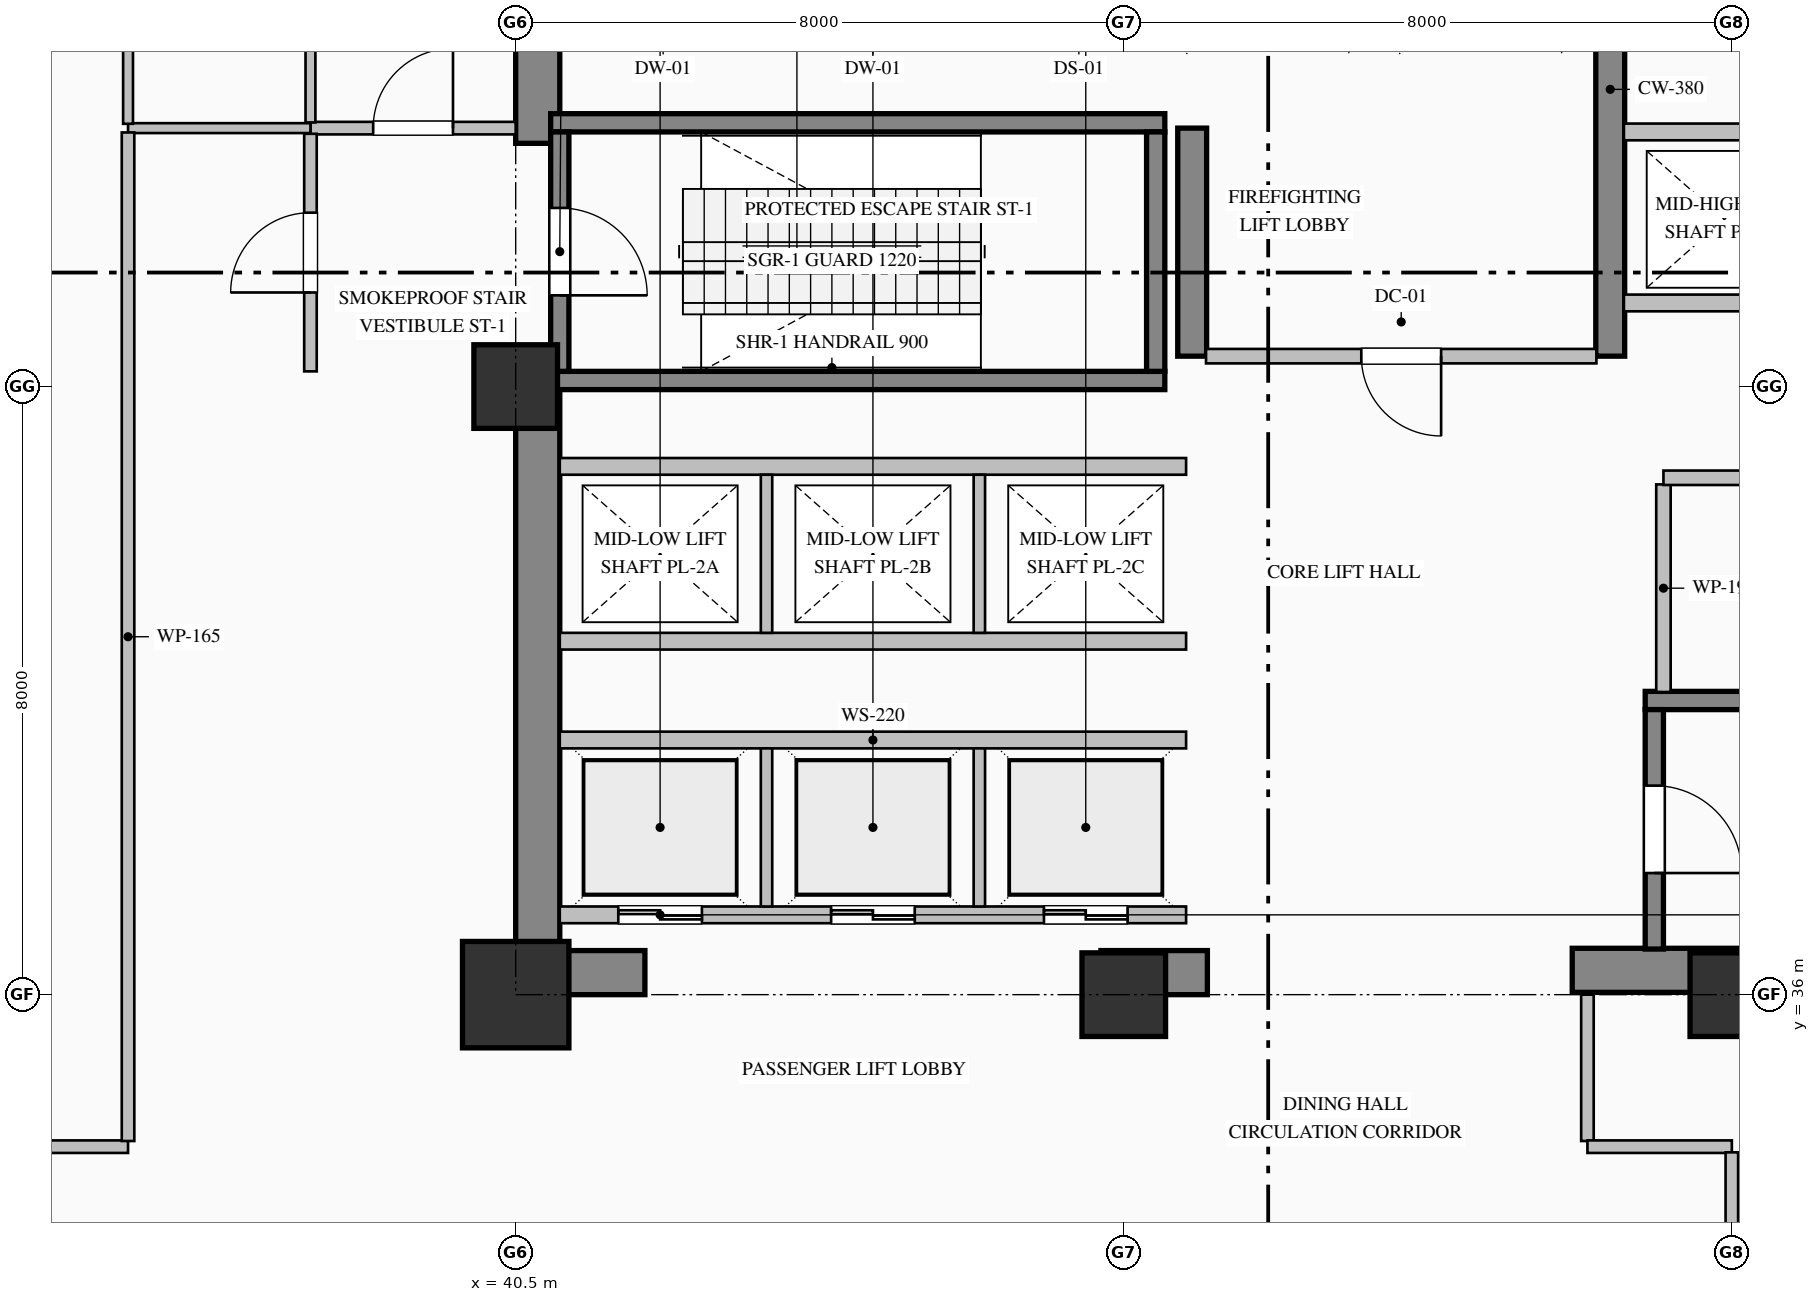
"""IFC4 building model, lengths in metres.
Left out: names, types, materials, properties, quantities, classifications, styles, units other than length and angle.
Written with IfcOpenShell. Run it as: python <this file> out.ifc"""

import sys

from ifc_helpers import new_model, si_unit, direction, frame, frame_2d, origin, origin_2d, place, context, subcontext, project, spatial, rectangle, hollow_rectangle, extrude, element, fill, save


model = new_model("IFC4")
c1 = context("Model", 3, precision=1e-05, world=origin(), true_north=direction((0.0, 1.0)))
c2 = subcontext(c1, "Body", "Model", "MODEL_VIEW")
j1 = project(units=[si_unit("LENGTHUNIT", "METRE"), si_unit("PLANEANGLEUNIT", "RADIAN")], contexts=[c1])
p1 = place(None, origin())
s1 = spatial("IfcSite", under=j1, at=p1, CompositionType="ELEMENT")
p2 = place(p1, origin())
s2 = spatial("IfcBuilding", under=s1, at=p2, CompositionType="ELEMENT")
p3 = place(p2, frame((0.0, 0.0, 22.8)))
s3 = spatial("IfcBuildingStorey", under=s2, at=p3, CompositionType="ELEMENT", Elevation=22.8)
p4 = place(p3, frame((40.79, 36.58, 0.0), z_axis=(0.0, 0.0, 1.0), x_axis=(0.0, 1.0, 0.0)))
e1 = element("IfcWall", 1, at=p4, inside=s3, PredefinedType="SHEAR", context=c2, shape_type="SweptSolid", body=[
    extrude(rectangle(XDim=7.82, YDim=0.58, at=frame_2d((3.91, 0.0))), origin(), (0.0, 0.0, 1.0), 5.15),
])
p5 = place(p3, frame((40.79, 47.2, 0.0), z_axis=(0.0, 0.0, 1.0), x_axis=(0.0, 1.0, 0.0)))
e2 = element("IfcWall", 2, at=p5, inside=s3, PredefinedType="SHEAR", context=c2, shape_type="SweptSolid", body=[
    extrude(rectangle(XDim=4.22, YDim=0.58, at=frame_2d((2.11, 0.0))), origin(), (0.0, 0.0, 1.0), 5.15),
])
p6 = place(p3, frame((40.5, 36.29, 0.0), z_axis=(0.0, 0.0, 1.0), x_axis=(1.0, 0.0, 0.0)))
e3 = element("IfcWall", 3, at=p6, inside=s3, PredefinedType="SHEAR", context=c2, shape_type="SweptSolid", body=[
    extrude(rectangle(XDim=1.7, YDim=0.58, at=frame_2d((0.85, 0.0))), origin(), (0.0, 0.0, 1.0), 5.15),
])
p7 = place(p3, frame((48.2, 36.29, 0.0), z_axis=(0.0, 0.0, 1.0), x_axis=(1.0, 0.0, 0.0)))
e4 = element("IfcWall", 4, at=p7, inside=s3, PredefinedType="SHEAR", context=c2, shape_type="SweptSolid", body=[
    extrude(rectangle(XDim=1.4, YDim=0.58, at=frame_2d((0.7, 0.0))), origin(), (0.0, 0.0, 1.0), 5.15),
])
p8 = place(p3, frame((54.4, 36.32, 0.0), z_axis=(0.0, 0.0, 1.0), x_axis=(1.0, 0.0, 0.0)))
e5 = element("IfcWall", 5, at=p8, inside=s3, PredefinedType="SHEAR", context=c2, shape_type="SweptSolid", body=[
    extrude(rectangle(XDim=9.6, YDim=0.58, at=frame_2d((4.8, 0.0))), origin(), (0.0, 0.0, 1.0), 5.4),
])
p9 = place(p3, frame((49.4, 44.4, 0.0), z_axis=(0.0, 0.0, 1.0), x_axis=(0.0, 1.0, 0.0)))
e6 = element("IfcWall", 6, at=p9, inside=s3, PredefinedType="SHEAR", context=c2, shape_type="SweptSolid", body=[
    extrude(rectangle(XDim=3.0, YDim=0.38, at=frame_2d((1.5, 0.0))), origin(), (0.0, 0.0, 1.0), 5.15),
])
p10 = place(p3, frame((54.9, 44.4, 0.0), z_axis=(0.0, 0.0, 1.0), x_axis=(0.0, 1.0, 0.0)))
e7 = element("IfcWall", 7, at=p10, inside=s3, PredefinedType="SHEAR", context=c2, shape_type="SweptSolid", body=[
    extrude(rectangle(XDim=7.02, YDim=0.38, at=frame_2d((3.51, 0.0))), origin(), (0.0, 0.0, 1.0), 5.15),
])
p11 = place(p3, frame((40.5, 36.0, 0.0), z_axis=(0.0, 0.0, 1.0), x_axis=(1.0, 0.0, 0.0)))
e8 = element("IfcColumn", 8, at=p11, inside=s3, PredefinedType="COLUMN", context=c2, shape_type="SweptSolid", body=[
    extrude(hollow_rectangle(XDim=1.4, YDim=1.4, WallThickness=0.05, at=origin_2d()), origin(), (0.0, 0.0, 1.0), 5.4),
])
for number, where, z_axis, x_axis in (
    (9, (40.5, 44.0, 0.0), (0.0, 0.0, 1.0), (1.0, 0.0, 0.0)),
    (10, (48.5, 36.0, 0.0), (0.0, 0.0, 1.0), (1.0, 0.0, 0.0)),
    (11, (56.5, 36.0, 0.0), (0.0, 0.0, 1.0), (1.0, 0.0, 0.0)),
):
    element("IfcColumn", number, at=place(p3, frame(where, z_axis=z_axis, x_axis=x_axis)), inside=s3, PredefinedType="COLUMN", context=c2, shape_type="SweptSolid", body=[
        extrude(rectangle(XDim=1.1, YDim=1.1, at=origin_2d()), origin(), (0.0, 0.0, 1.0), 5.4),
    ])
for number, where, z_axis, x_axis in (
    (12, (40.96, 47.47, 0.0), (0.0, 0.0, 1.0), (1.0, 0.0, 0.0)),
    (13, (49.04, 44.08, 0.0), (0.0, 0.0, 1.0), (-1.0, 0.0, 0.0)),
):
    element("IfcWall", number, at=place(p3, frame(where, z_axis=z_axis, x_axis=x_axis)), inside=s3, PredefinedType="SOLIDWALL", context=c2, shape_type="SweptSolid", body=[
        extrude(rectangle(XDim=8.08, YDim=0.24, at=frame_2d((4.04, 0.0))), origin(), (0.0, 0.0, 1.0), 5.4),
    ])
p12 = place(p3, frame((41.08, 47.35, 0.0), z_axis=(0.0, 0.0, 1.0), x_axis=(0.0, -1.0, 0.0)))
e14 = element("IfcWall", 14, at=p12, inside=s3, PredefinedType="SOLIDWALL", context=c2, shape_type="SweptSolid", body=[
    extrude(rectangle(XDim=3.15, YDim=0.24, at=frame_2d((1.575, 0.0))), origin(), (0.0, 0.0, 1.0), 5.4),
])
p13 = place(p12, frame((1.0, 0.0, 0.0)))
e15 = element("IfcOpeningElement", 15, at=p13, cuts=e14, PredefinedType="OPENING", context=c2, shape_type="SweptSolid", body=[
    extrude(rectangle(XDim=1.15, YDim=2.2, at=frame_2d((0.575, 1.1))), frame((0.0, 0.13, 0.0), z_axis=(0.0, -1.0, 0.0), x_axis=(1.0, 0.0, 0.0)), (0.0, 0.0, 1.0), 0.26),
])
p14 = place(p3, frame((48.92, 44.2, 0.0), z_axis=(0.0, 0.0, 1.0), x_axis=(0.0, 1.0, 0.0)))
e16 = element("IfcWall", 16, at=p14, inside=s3, PredefinedType="SOLIDWALL", context=c2, shape_type="SweptSolid", body=[
    extrude(rectangle(XDim=3.15, YDim=0.24, at=frame_2d((1.575, 0.0))), origin(), (0.0, 0.0, 1.0), 5.4),
])
p15 = place(p3, frame((55.36, 39.87, 0.0), z_axis=(0.0, 0.0, 1.0), x_axis=(1.0, 0.0, 0.0)))
e17 = element("IfcWall", 17, at=p15, inside=s3, PredefinedType="SOLIDWALL", context=c2, shape_type="SweptSolid", body=[
    extrude(rectangle(XDim=8.08, YDim=0.24, at=frame_2d((4.04, 0.0))), origin(), (0.0, 0.0, 1.0), 5.4),
])
p16 = place(p3, frame((55.48, 39.75, 0.0), z_axis=(0.0, 0.0, 1.0), x_axis=(0.0, -1.0, 0.0)))
e18 = element("IfcWall", 18, at=p16, inside=s3, PredefinedType="SOLIDWALL", context=c2, shape_type="SweptSolid", body=[
    extrude(rectangle(XDim=3.15, YDim=0.24, at=frame_2d((1.575, 0.0))), origin(), (0.0, 0.0, 1.0), 5.4),
])
p17 = place(p16, frame((1.0, 0.0, 0.0)))
e19 = element("IfcOpeningElement", 19, at=p17, cuts=e18, PredefinedType="OPENING", context=c2, shape_type="SweptSolid", body=[
    extrude(rectangle(XDim=1.15, YDim=2.2, at=frame_2d((0.575, 1.1))), frame((0.0, 0.13, 0.0), z_axis=(0.0, -1.0, 0.0), x_axis=(1.0, 0.0, 0.0)), (0.0, 0.0, 1.0), 0.26),
])
p18 = place(p3, frame((49.32, 37.05, 0.0), z_axis=(0.0, 0.0, 1.0), x_axis=(-1.0, 0.0, 0.0)))
e20 = element("IfcWall", 20, at=p18, inside=s3, PredefinedType="PARTITIONING", context=c2, shape_type="SweptSolid", body=[
    extrude(rectangle(XDim=8.24, YDim=0.22, at=frame_2d((4.12, 0.0))), origin(), (0.0, 0.0, 1.0), 5.15),
])
p19 = place(p18, frame((6.37, 0.0, 0.0)))
e21 = element("IfcOpeningElement", 21, at=p19, cuts=e20, PredefinedType="OPENING", context=c2, shape_type="SweptSolid", body=[
    extrude(rectangle(XDim=1.1, YDim=2.2, at=frame_2d((0.55, 1.1))), frame((0.0, 0.12, 0.0), z_axis=(0.0, -1.0, 0.0), x_axis=(1.0, 0.0, 0.0)), (0.0, 0.0, 1.0), 0.24),
])
p20 = place(p18, frame((3.57, 0.0, 0.0)))
e22 = element("IfcOpeningElement", 22, at=p20, cuts=e20, PredefinedType="OPENING", context=c2, shape_type="SweptSolid", body=[
    extrude(rectangle(XDim=1.1, YDim=2.2, at=frame_2d((0.55, 1.1))), frame((0.0, 0.12, 0.0), z_axis=(0.0, -1.0, 0.0), x_axis=(1.0, 0.0, 0.0)), (0.0, 0.0, 1.0), 0.24),
])
p21 = place(p18, frame((0.77, 0.0, 0.0)))
e23 = element("IfcOpeningElement", 23, at=p21, cuts=e20, PredefinedType="OPENING", context=c2, shape_type="SweptSolid", body=[
    extrude(rectangle(XDim=1.1, YDim=2.2, at=frame_2d((0.55, 1.1))), frame((0.0, 0.12, 0.0), z_axis=(0.0, -1.0, 0.0), x_axis=(1.0, 0.0, 0.0)), (0.0, 0.0, 1.0), 0.24),
])
p22 = place(p3, frame((41.08, 39.35, 0.0), z_axis=(0.0, 0.0, 1.0), x_axis=(1.0, 0.0, 0.0)))
e24 = element("IfcWall", 24, at=p22, inside=s3, PredefinedType="PARTITIONING", context=c2, shape_type="SweptSolid", body=[
    extrude(rectangle(XDim=8.24, YDim=0.22, at=frame_2d((4.12, 0.0))), origin(), (0.0, 0.0, 1.0), 5.15),
])
for number, where, z_axis, x_axis in (
    (25, (43.8, 37.16, 0.0), (0.0, 0.0, 1.0), (0.0, 1.0, 0.0)),
    (26, (46.6, 37.16, 0.0), (0.0, 0.0, 1.0), (0.0, 1.0, 0.0)),
):
    element("IfcWall", number, at=place(p3, frame(where, z_axis=z_axis, x_axis=x_axis)), inside=s3, PredefinedType="PARTITIONING", context=c2, shape_type="SweptSolid", body=[
        extrude(rectangle(XDim=2.08, YDim=0.15, at=frame_2d((1.04, 0.0))), origin(), (0.0, 0.0, 1.0), 5.15),
    ])
for number, where, z_axis, x_axis in (
    (27, (49.32, 40.65, 0.0), (0.0, 0.0, 1.0), (-1.0, 0.0, 0.0)),
    (28, (41.08, 42.95, 0.0), (0.0, 0.0, 1.0), (1.0, 0.0, 0.0)),
):
    element("IfcWall", number, at=place(p3, frame(where, z_axis=z_axis, x_axis=x_axis)), inside=s3, PredefinedType="PARTITIONING", context=c2, shape_type="SweptSolid", body=[
        extrude(rectangle(XDim=8.24, YDim=0.22, at=frame_2d((4.12, 0.0))), origin(), (0.0, 0.0, 1.0), 5.15),
    ])
for number, where, z_axis, x_axis in (
    (29, (43.8, 40.76, 0.0), (0.0, 0.0, 1.0), (0.0, 1.0, 0.0)),
    (30, (46.6, 40.76, 0.0), (0.0, 0.0, 1.0), (0.0, 1.0, 0.0)),
):
    element("IfcWall", number, at=place(p3, frame(where, z_axis=z_axis, x_axis=x_axis)), inside=s3, PredefinedType="PARTITIONING", context=c2, shape_type="SweptSolid", body=[
        extrude(rectangle(XDim=2.08, YDim=0.15, at=frame_2d((1.04, 0.0))), origin(), (0.0, 0.0, 1.0), 5.15),
    ])
for number, where, z_axis, x_axis in (
    (31, (63.32, 45.1, 0.0), (0.0, 0.0, 1.0), (-1.0, 0.0, 0.0)),
    (32, (55.08, 47.35, 0.0), (0.0, 0.0, 1.0), (1.0, 0.0, 0.0)),
):
    element("IfcWall", number, at=place(p3, frame(where, z_axis=z_axis, x_axis=x_axis)), inside=s3, PredefinedType="PARTITIONING", context=c2, shape_type="SweptSolid", body=[
        extrude(rectangle(XDim=8.24, YDim=0.22, at=frame_2d((4.12, 0.0))), origin(), (0.0, 0.0, 1.0), 5.15),
    ])
p23 = place(p3, frame((37.8, 47.4, 0.0), z_axis=(0.0, 0.0, 1.0), x_axis=(1.0, 0.0, 0.0)))
e33 = element("IfcWall", 33, at=p23, inside=s3, PredefinedType="PARTITIONING", context=c2, shape_type="SweptSolid", body=[
    extrude(rectangle(XDim=2.7, YDim=0.165, at=frame_2d((1.35, 0.0))), origin(), (0.0, 0.0, 1.0), 5.15),
])
p24 = place(p23, frame((0.825, 0.0, 0.0)))
e34 = element("IfcOpeningElement", 34, at=p24, cuts=e33, PredefinedType="OPENING", context=c2, shape_type="SweptSolid", body=[
    extrude(rectangle(XDim=1.05, YDim=2.15, at=frame_2d((0.525, 1.075))), frame((0.0, 0.093, 0.0), z_axis=(0.0, -1.0, 0.0), x_axis=(1.0, 0.0, 0.0)), (0.0, 0.0, 1.0), 0.185),
])
p25 = place(p3, frame((37.8, 44.2, 0.0), z_axis=(0.0, 0.0, 1.0), x_axis=(0.0, 1.0, 0.0)))
e35 = element("IfcWall", 35, at=p25, inside=s3, PredefinedType="PARTITIONING", context=c2, shape_type="SweptSolid", body=[
    extrude(rectangle(XDim=3.125, YDim=0.165, at=frame_2d((1.563, 0.0))), origin(), (0.0, 0.0, 1.0), 5.15),
])
p26 = place(p25, frame((1.038, 0.0, 0.0)))
e36 = element("IfcOpeningElement", 36, at=p26, cuts=e35, PredefinedType="OPENING", context=c2, shape_type="SweptSolid", body=[
    extrude(rectangle(XDim=1.05, YDim=2.15, at=frame_2d((0.525, 1.075))), frame((0.0, 0.093, 0.0), z_axis=(0.0, -1.0, 0.0), x_axis=(1.0, 0.0, 0.0)), (0.0, 0.0, 1.0), 0.185),
])
p27 = place(p3, frame((37.8, 47.475, 0.0), z_axis=(0.0, 0.0, 1.0), x_axis=(0.0, 1.0, 0.0)))
e37 = element("IfcWall", 37, at=p27, inside=s3, PredefinedType="PARTITIONING", context=c2, shape_type="SweptSolid", body=[
    extrude(rectangle(XDim=4.153, YDim=0.13, at=frame_2d((2.077, 0.0))), origin(), (0.0, 0.0, 1.0), 5.15),
])
p28 = place(p27, frame((1.567, 0.0, 0.0)))
e38 = element("IfcOpeningElement", 38, at=p28, cuts=e37, PredefinedType="OPENING", context=c2, shape_type="SweptSolid", body=[
    extrude(rectangle(XDim=1.02, YDim=2.15, at=frame_2d((0.51, 1.075))), frame((0.0, 0.075, 0.0), z_axis=(0.0, -1.0, 0.0), x_axis=(1.0, 0.0, 0.0)), (0.0, 0.0, 1.0), 0.15),
])
p29 = place(p3, frame((37.8, 47.4, 0.0), z_axis=(0.0, 0.0, 1.0), x_axis=(-1.0, 0.0, 0.0)))
e39 = element("IfcWall", 39, at=p29, inside=s3, PredefinedType="PARTITIONING", context=c2, shape_type="SweptSolid", body=[
    extrude(rectangle(XDim=2.4, YDim=0.13, at=frame_2d((1.2, 0.0))), origin(), (0.0, 0.0, 1.0), 5.15),
])
p30 = place(p3, frame((35.4, 47.457, 0.0), z_axis=(0.0, 0.0, 1.0), x_axis=(0.0, 1.0, 0.0)))
e40 = element("IfcWall", 40, at=p30, inside=s3, PredefinedType="PARTITIONING", context=c2, shape_type="SweptSolid", body=[
    extrude(rectangle(XDim=4.171, YDim=0.13, at=frame_2d((2.085, 0.0))), origin(), (0.0, 0.0, 1.0), 5.15),
])
p31 = place(p3, frame((54.718, 44.4, 0.0), z_axis=(0.0, 0.0, 1.0), x_axis=(-1.0, 0.0, 0.0)))
e41 = element("IfcWall", 41, at=p31, inside=s3, PredefinedType="PARTITIONING", context=c2, shape_type="SweptSolid", body=[
    extrude(rectangle(XDim=5.136, YDim=0.19, at=frame_2d((2.568, 0.0))), origin(), (0.0, 0.0, 1.0), 5.15),
])
p32 = place(p31, frame((2.043, 0.0, 0.0)))
e42 = element("IfcOpeningElement", 42, at=p32, cuts=e41, PredefinedType="OPENING", context=c2, shape_type="SweptSolid", body=[
    extrude(rectangle(XDim=1.05, YDim=2.15, at=frame_2d((0.525, 1.075))), frame((0.0, 0.105, 0.0), z_axis=(0.0, -1.0, 0.0), x_axis=(1.0, 0.0, 0.0)), (0.0, 0.0, 1.0), 0.21),
])
p33 = place(p3, frame((55.6, 42.713, 0.0), z_axis=(0.0, 0.0, 1.0), x_axis=(0.0, -1.0, 0.0)))
e43 = element("IfcWall", 43, at=p33, inside=s3, PredefinedType="PARTITIONING", context=c2, shape_type="SweptSolid", body=[
    extrude(rectangle(XDim=2.731, YDim=0.19, at=frame_2d((1.365, 0.0))), origin(), (0.0, 0.0, 1.0), 5.15),
])
p34 = place(p3, frame((63.42, 42.8, 0.0), z_axis=(0.0, 0.0, 1.0), x_axis=(-1.0, 0.0, 0.0)))
e44 = element("IfcWall", 44, at=p34, inside=s3, PredefinedType="PARTITIONING", context=c2, shape_type="SweptSolid", body=[
    extrude(rectangle(XDim=7.82, YDim=0.19, at=frame_2d((3.91, 0.0))), origin(), (0.0, 0.0, 1.0), 5.15),
])
p35 = place(p34, frame((3.21, 0.0, 0.0)))
e45 = element("IfcOpeningElement", 45, at=p35, cuts=e44, PredefinedType="OPENING", context=c2, shape_type="SweptSolid", body=[
    extrude(rectangle(XDim=1.4, YDim=2.25, at=frame_2d((0.7, 1.125))), frame((0.0, 0.105, 0.0), z_axis=(0.0, -1.0, 0.0), x_axis=(1.0, 0.0, 0.0)), (0.0, 0.0, 1.0), 0.21),
])
p36 = place(p3, frame((54.6, 36.0, 0.0), z_axis=(0.0, 0.0, 1.0), x_axis=(0.0, -1.0, 0.0)))
e46 = element("IfcWall", 46, at=p36, inside=s3, PredefinedType="PARTITIONING", context=c2, shape_type="SweptSolid", body=[
    extrude(rectangle(XDim=1.926, YDim=0.165, at=frame_2d((0.963, 0.0))), origin(), (0.0, 0.0, 1.0), 5.15),
])
p37 = place(p3, frame((54.6, 34.0, 0.0), z_axis=(0.0, 0.0, 1.0), x_axis=(1.0, 0.0, 0.0)))
e47 = element("IfcWall", 47, at=p37, inside=s3, PredefinedType="PARTITIONING", context=c2, shape_type="SweptSolid", body=[
    extrude(rectangle(XDim=1.9, YDim=0.165, at=frame_2d((0.95, 0.0))), origin(), (0.0, 0.0, 1.0), 5.15),
])
p38 = place(p3, frame((56.5, 33.926, 0.0), z_axis=(0.0, 0.0, 1.0), x_axis=(0.0, -1.0, 0.0)))
e48 = element("IfcWall", 48, at=p38, inside=s3, PredefinedType="PARTITIONING", context=c2, shape_type="SweptSolid", body=[
    extrude(rectangle(XDim=2.051, YDim=0.165, at=frame_2d((1.025, 0.0))), origin(), (0.0, 0.0, 1.0), 4.442),
])
p39 = place(p3, frame((16.5, 34.0, 0.0), z_axis=(0.0, 0.0, 1.0), x_axis=(1.0, 0.0, 0.0)))
e49 = element("IfcWall", 49, at=p39, inside=s3, PredefinedType="PARTITIONING", context=c2, shape_type="SweptSolid", body=[
    extrude(rectangle(XDim=18.9, YDim=0.165, at=frame_2d((9.45, 0.0))), origin(), (0.0, 0.0, 1.0), 5.15),
])
p40 = place(p39, frame((8.95, 0.0, 0.0)))
e50 = element("IfcOpeningElement", 50, at=p40, cuts=e49, PredefinedType="OPENING", context=c2, shape_type="SweptSolid", body=[
    extrude(rectangle(XDim=1.0, YDim=2.15, at=frame_2d((0.5, 1.075))), frame((0.0, 0.093, 0.0), z_axis=(0.0, -1.0, 0.0), x_axis=(1.0, 0.0, 0.0)), (0.0, 0.0, 1.0), 0.185),
])
p41 = place(p3, frame((35.4, 34.074, 0.0), z_axis=(0.0, 0.0, 1.0), x_axis=(0.0, 1.0, 0.0)))
e51 = element("IfcWall", 51, at=p41, inside=s3, PredefinedType="PARTITIONING", context=c2, shape_type="SweptSolid", body=[
    extrude(rectangle(XDim=13.269, YDim=0.165, at=frame_2d((6.634, 0.0))), origin(), (0.0, 0.0, 1.0), 5.15),
])
p42 = place(p13, origin())
e52 = element("IfcDoor", 52, at=p42, inside=s3, OperationType="SINGLE_SWING_RIGHT", PredefinedType="DOOR", context=c2, shape_type="SweptSolid", body=[
    extrude(rectangle(XDim=1.15, YDim=2.2, at=frame_2d((0.575, 1.1))), frame((0.0, 0.025, 0.0), z_axis=(0.0, -1.0, 0.0), x_axis=(1.0, 0.0, 0.0)), (0.0, 0.0, 1.0), 0.05),
])
fill(e15, e52)
p43 = place(p17, origin())
e53 = element("IfcDoor", 53, at=p43, inside=s3, OperationType="SINGLE_SWING_RIGHT", PredefinedType="DOOR", context=c2, shape_type="SweptSolid", body=[
    extrude(rectangle(XDim=1.15, YDim=2.2, at=frame_2d((0.575, 1.1))), frame((0.0, 0.025, 0.0), z_axis=(0.0, -1.0, 0.0), x_axis=(1.0, 0.0, 0.0)), (0.0, 0.0, 1.0), 0.05),
])
fill(e19, e53)
p44 = place(p19, origin())
e54 = element("IfcDoor", 54, at=p44, inside=s3, OperationType="DOUBLE_DOOR_SLIDING", PredefinedType="DOOR", context=c2, shape_type="SweptSolid", body=[
    extrude(rectangle(XDim=1.1, YDim=2.2, at=frame_2d((0.55, 1.1))), frame((0.0, 0.025, 0.0), z_axis=(0.0, -1.0, 0.0), x_axis=(1.0, 0.0, 0.0)), (0.0, 0.0, 1.0), 0.05),
])
fill(e21, e54)
p45 = place(p20, origin())
e55 = element("IfcDoor", 55, at=p45, inside=s3, OperationType="DOUBLE_DOOR_SLIDING", PredefinedType="DOOR", context=c2, shape_type="SweptSolid", body=[
    extrude(rectangle(XDim=1.1, YDim=2.2, at=frame_2d((0.55, 1.1))), frame((0.0, 0.025, 0.0), z_axis=(0.0, -1.0, 0.0), x_axis=(1.0, 0.0, 0.0)), (0.0, 0.0, 1.0), 0.05),
])
fill(e22, e55)
p46 = place(p21, origin())
e56 = element("IfcDoor", 56, at=p46, inside=s3, OperationType="DOUBLE_DOOR_SLIDING", PredefinedType="DOOR", context=c2, shape_type="SweptSolid", body=[
    extrude(rectangle(XDim=1.1, YDim=2.2, at=frame_2d((0.55, 1.1))), frame((0.0, 0.025, 0.0), z_axis=(0.0, -1.0, 0.0), x_axis=(1.0, 0.0, 0.0)), (0.0, 0.0, 1.0), 0.05),
])
fill(e23, e56)
p47 = place(p32, origin())
e57 = element("IfcDoor", 57, at=p47, inside=s3, OperationType="SINGLE_SWING_LEFT", PredefinedType="DOOR", context=c2, shape_type="SweptSolid", body=[
    extrude(rectangle(XDim=1.05, YDim=2.15, at=frame_2d((0.525, 1.075))), frame((0.0, 0.025, 0.0), z_axis=(0.0, -1.0, 0.0), x_axis=(1.0, 0.0, 0.0)), (0.0, 0.0, 1.0), 0.05),
])
fill(e42, e57)
p48 = place(p26, origin())
e58 = element("IfcDoor", 58, at=p48, inside=s3, OperationType="SINGLE_SWING_LEFT", PredefinedType="DOOR", context=c2, shape_type="SweptSolid", body=[
    extrude(rectangle(XDim=1.05, YDim=2.15, at=frame_2d((0.525, 1.075))), frame((0.0, 0.025, 0.0), z_axis=(0.0, -1.0, 0.0), x_axis=(1.0, 0.0, 0.0)), (0.0, 0.0, 1.0), 0.05),
])
fill(e36, e58)
p49 = place(p24, origin())
e59 = element("IfcDoor", 59, at=p49, inside=s3, OperationType="SINGLE_SWING_RIGHT", PredefinedType="DOOR", context=c2, shape_type="SweptSolid", body=[
    extrude(rectangle(XDim=1.05, YDim=2.15, at=frame_2d((0.525, 1.075))), frame((0.0, 0.025, 0.0), z_axis=(0.0, -1.0, 0.0), x_axis=(1.0, 0.0, 0.0)), (0.0, 0.0, 1.0), 0.05),
])
fill(e34, e59)
save(model, sys.argv[1])
